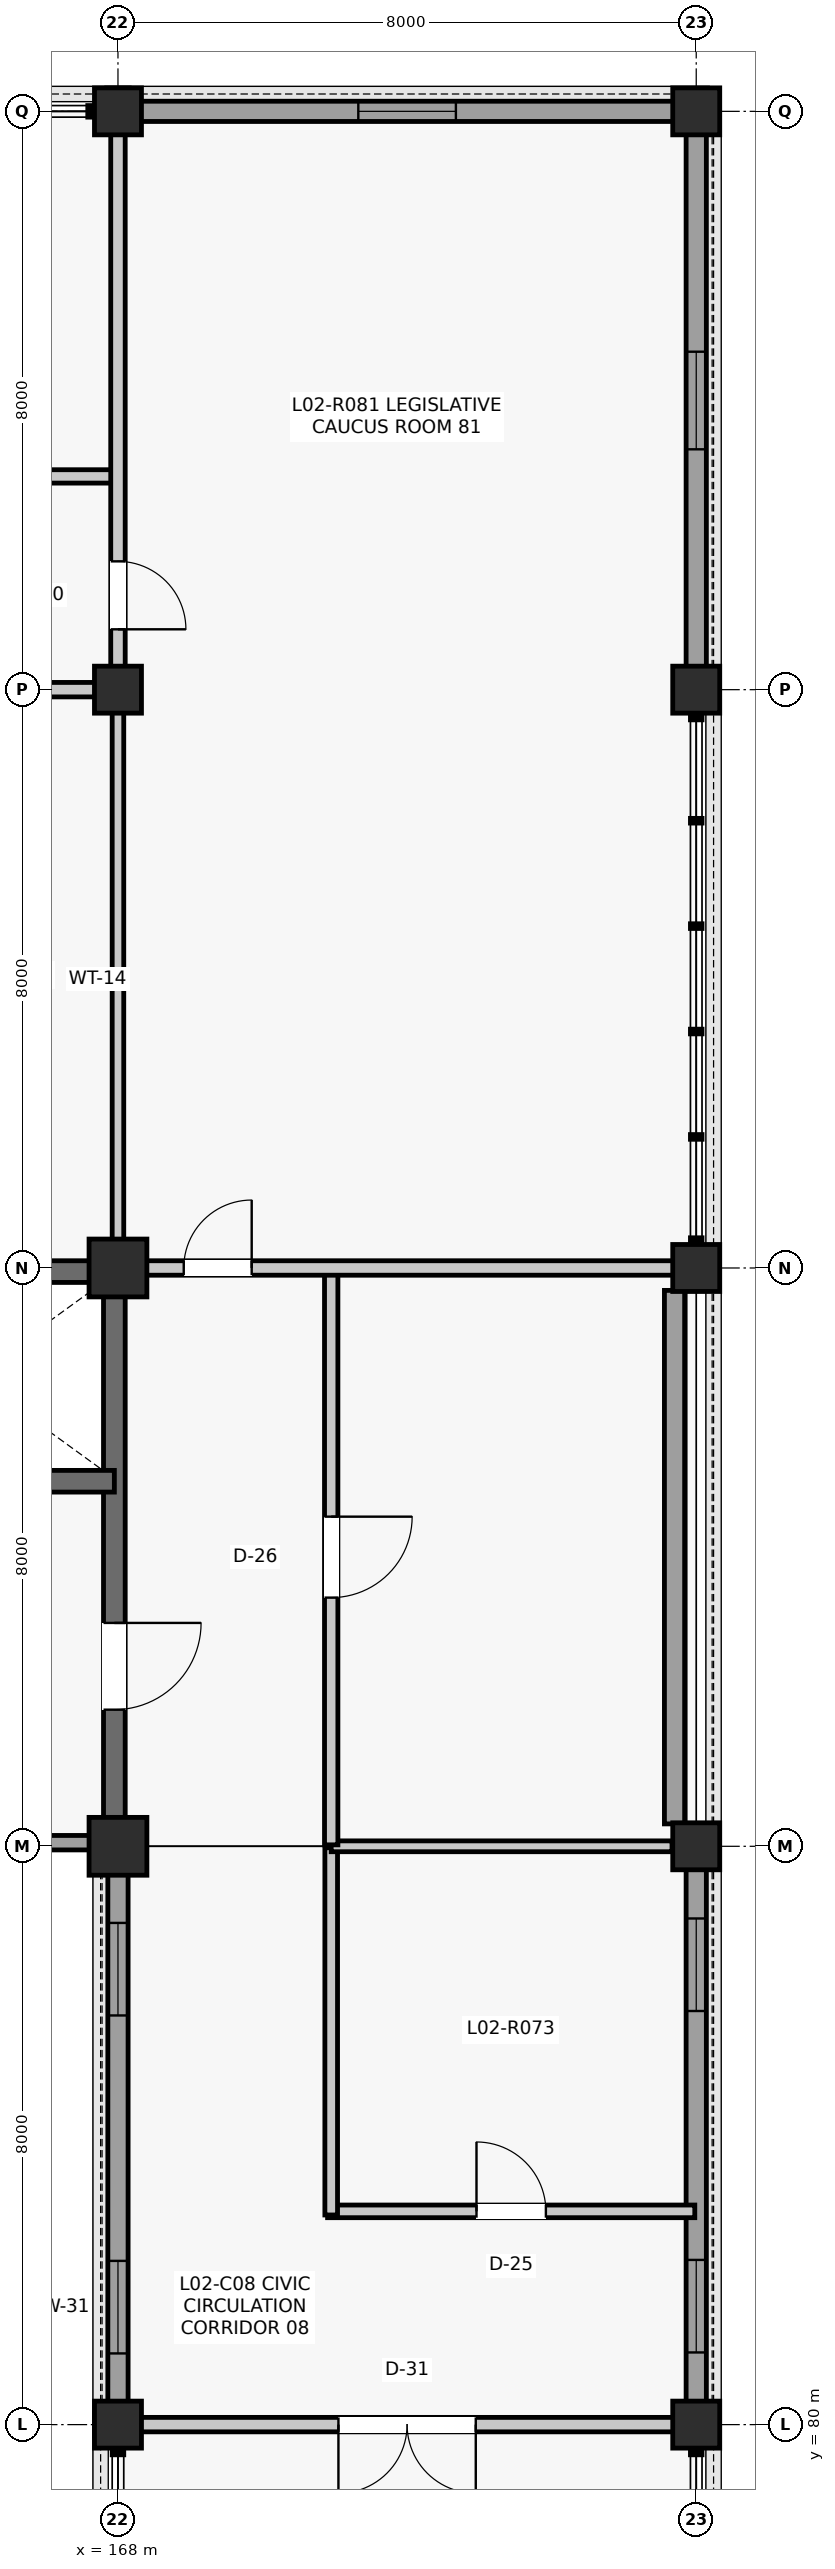
"""IFC4 building model, lengths in metres.
Left out: names, types, materials, properties, quantities, classifications, styles, units other than length and angle.
Written with IfcOpenShell. Run it as: python <this file> out.ifc"""

import sys

from ifc_helpers import new_model, si_unit, direction, frame, frame_2d, origin, origin_2d, place, context, subcontext, project, spatial, rectangle, extrude, element, fill, save


model = new_model("IFC4")
c1 = context("Model", 3, precision=1e-05, world=origin(), true_north=direction((0.0, 1.0)))
c2 = subcontext(c1, "Body", "Model", "MODEL_VIEW")
j1 = project(units=[si_unit("LENGTHUNIT", "METRE"), si_unit("PLANEANGLEUNIT", "RADIAN")], contexts=[c1])
p1 = place(None, origin())
s1 = spatial("IfcSite", under=j1, at=p1, CompositionType="ELEMENT")
p2 = place(p1, origin())
s2 = spatial("IfcBuilding", under=s1, at=p2, CompositionType="ELEMENT")
p3 = place(p2, frame((0.0, 0.0, 9.9)))
s3 = spatial("IfcBuildingStorey", under=s2, at=p3, CompositionType="ELEMENT", Elevation=9.9)
p4 = place(p3, frame((168.0, 80.0, 0.0), z_axis=(0.0, 0.0, 1.0), x_axis=(1.0, 0.0, 0.0)))
e1 = element("IfcColumn", 1, at=p4, inside=s3, PredefinedType="COLUMN", context=c2, shape_type="SweptSolid", body=[
    extrude(rectangle(XDim=0.65, YDim=0.65, at=origin_2d()), origin(), (0.0, 0.0, 1.0), 3.96),
])
for number, where, z_axis, x_axis in (
    (2, (168.0, 88.0, 0.0), (0.0, 0.0, 1.0), (1.0, 0.0, 0.0)),
    (3, (168.0, 96.0, 0.0), (0.0, 0.0, 1.0), (1.0, 0.0, 0.0)),
):
    element("IfcColumn", number, at=place(p3, frame(where, z_axis=z_axis, x_axis=x_axis)), inside=s3, PredefinedType="COLUMN", context=c2, shape_type="SweptSolid", body=[
        extrude(rectangle(XDim=0.8, YDim=0.8, at=origin_2d()), origin(), (0.0, 0.0, 1.0), 3.96),
    ])
for number, where, z_axis, x_axis in (
    (4, (168.0, 104.0, 0.0), (0.0, 0.0, 1.0), (1.0, 0.0, 0.0)),
    (5, (168.0, 112.0, 0.0), (0.0, 0.0, 1.0), (1.0, 0.0, 0.0)),
    (6, (176.0, 80.0, 0.0), (0.0, 0.0, 1.0), (1.0, 0.0, 0.0)),
    (7, (176.0, 88.0, 0.0), (0.0, 0.0, 1.0), (1.0, 0.0, 0.0)),
    (8, (176.0, 96.0, 0.0), (0.0, 0.0, 1.0), (1.0, 0.0, 0.0)),
    (9, (176.0, 104.0, 0.0), (0.0, 0.0, 1.0), (1.0, 0.0, 0.0)),
    (10, (176.0, 112.0, 0.0), (0.0, 0.0, 1.0), (1.0, 0.0, 0.0)),
):
    element("IfcColumn", number, at=place(p3, frame(where, z_axis=z_axis, x_axis=x_axis)), inside=s3, PredefinedType="COLUMN", context=c2, shape_type="SweptSolid", body=[
        extrude(rectangle(XDim=0.65, YDim=0.65, at=origin_2d()), origin(), (0.0, 0.0, 1.0), 3.96),
    ])
p5 = place(p3, frame((168.0, 80.31, 0.0), z_axis=(0.0, 0.0, 1.0), x_axis=(0.0, 1.0, 0.0)))
e11 = element("IfcWall", 11, at=p5, inside=s3, PredefinedType="SOLIDWALL", context=c2, shape_type="SweptSolid", body=[
    extrude(rectangle(XDim=7.305, YDim=0.28, at=frame_2d((3.652, 0.0))), origin(), (0.0, 0.0, 1.0), 3.344),
])
p6 = place(p5, frame((0.675, 0.0, 0.95)))
e12 = element("IfcOpeningElement", 12, at=p6, cuts=e11, PredefinedType="OPENING", context=c2, shape_type="SweptSolid", body=[
    extrude(rectangle(XDim=1.28, YDim=1.72, at=frame_2d((0.64, 0.86))), frame((0.0, 0.15, 0.0), z_axis=(0.0, -1.0, 0.0), x_axis=(1.0, 0.0, 0.0)), (0.0, 0.0, 1.0), 0.3),
])
p7 = place(p5, frame((5.35, 0.0, 0.95)))
e13 = element("IfcOpeningElement", 13, at=p7, cuts=e11, PredefinedType="OPENING", context=c2, shape_type="SweptSolid", body=[
    extrude(rectangle(XDim=1.28, YDim=1.72, at=frame_2d((0.64, 0.86))), frame((0.0, 0.15, 0.0), z_axis=(0.0, -1.0, 0.0), x_axis=(1.0, 0.0, 0.0)), (0.0, 0.0, 1.0), 0.3),
])
p8 = place(p3, frame((176.0, 80.31, 0.0), z_axis=(0.0, 0.0, 1.0), x_axis=(0.0, 1.0, 0.0)))
e14 = element("IfcWall", 14, at=p8, inside=s3, PredefinedType="SOLIDWALL", context=c2, shape_type="SweptSolid", body=[
    extrude(rectangle(XDim=7.38, YDim=0.28, at=frame_2d((3.69, 0.0))), origin(), (0.0, 0.0, 1.0), 3.284),
])
p9 = place(p8, frame((0.688, 0.0, 0.95)))
e15 = element("IfcOpeningElement", 15, at=p9, cuts=e14, PredefinedType="OPENING", context=c2, shape_type="SweptSolid", body=[
    extrude(rectangle(XDim=1.28, YDim=1.72, at=frame_2d((0.64, 0.86))), frame((0.0, 0.15, 0.0), z_axis=(0.0, -1.0, 0.0), x_axis=(1.0, 0.0, 0.0)), (0.0, 0.0, 1.0), 0.3),
])
p10 = place(p8, frame((5.412, 0.0, 0.95)))
e16 = element("IfcOpeningElement", 16, at=p10, cuts=e14, PredefinedType="OPENING", context=c2, shape_type="SweptSolid", body=[
    extrude(rectangle(XDim=1.28, YDim=1.72, at=frame_2d((0.64, 0.86))), frame((0.0, 0.15, 0.0), z_axis=(0.0, -1.0, 0.0), x_axis=(1.0, 0.0, 0.0)), (0.0, 0.0, 1.0), 0.3),
])
p11 = place(p3, frame((175.7, 88.31, 0.0), z_axis=(0.0, 0.0, 1.0), x_axis=(0.0, 1.0, 0.0)))
e17 = element("IfcWall", 17, at=p11, inside=s3, PredefinedType="SOLIDWALL", context=c2, shape_type="SweptSolid", body=[
    extrude(rectangle(XDim=7.38, YDim=0.28, at=frame_2d((3.69, 0.0))), origin(), (0.0, 0.0, 1.0), 3.347),
])
p12 = place(p3, frame((168.31, 112.0, 0.0), z_axis=(0.0, 0.0, 1.0), x_axis=(1.0, 0.0, 0.0)))
e18 = element("IfcWall", 18, at=p12, inside=s3, PredefinedType="SOLIDWALL", context=c2, shape_type="SweptSolid", body=[
    extrude(rectangle(XDim=7.38, YDim=0.28, at=frame_2d((3.69, 0.0))), origin(), (0.0, 0.0, 1.0), 3.344),
])
p13 = place(p12, frame((3.015, 0.0, 0.9)))
e19 = element("IfcOpeningElement", 19, at=p13, cuts=e18, PredefinedType="OPENING", context=c2, shape_type="SweptSolid", body=[
    extrude(rectangle(XDim=1.35, YDim=1.9, at=frame_2d((0.675, 0.95))), frame((0.0, 0.15, 0.0), z_axis=(0.0, -1.0, 0.0), x_axis=(1.0, 0.0, 0.0)), (0.0, 0.0, 1.0), 0.3),
])
p14 = place(p3, frame((176.0, 104.31, 0.0), z_axis=(0.0, 0.0, 1.0), x_axis=(0.0, 1.0, 0.0)))
e20 = element("IfcWall", 20, at=p14, inside=s3, PredefinedType="SOLIDWALL", context=c2, shape_type="SweptSolid", body=[
    extrude(rectangle(XDim=7.38, YDim=0.28, at=frame_2d((3.69, 0.0))), origin(), (0.0, 0.0, 1.0), 3.344),
])
p15 = place(p14, frame((3.015, 0.0, 0.9)))
e21 = element("IfcOpeningElement", 21, at=p15, cuts=e20, PredefinedType="OPENING", context=c2, shape_type="SweptSolid", body=[
    extrude(rectangle(XDim=1.35, YDim=1.9, at=frame_2d((0.675, 0.95))), frame((0.0, 0.15, 0.0), z_axis=(0.0, -1.0, 0.0), x_axis=(1.0, 0.0, 0.0)), (0.0, 0.0, 1.0), 0.3),
])
p16 = place(p3, frame((160.29, 95.95, 0.0), z_axis=(0.0, 0.0, 1.0), x_axis=(1.0, 0.0, 0.0)))
e22 = element("IfcWall", 22, at=p16, inside=s3, PredefinedType="SHEAR", context=c2, shape_type="SweptSolid", body=[
    extrude(rectangle(XDim=7.42, YDim=0.3, at=frame_2d((3.71, 0.0))), origin(), (0.0, 0.0, 1.0), 3.705),
])
p17 = place(p3, frame((167.95, 88.29, 0.0), z_axis=(0.0, 0.0, 1.0), x_axis=(0.0, 1.0, 0.0)))
e23 = element("IfcWall", 23, at=p17, inside=s3, PredefinedType="SHEAR", context=c2, shape_type="SweptSolid", body=[
    extrude(rectangle(XDim=7.42, YDim=0.3, at=frame_2d((3.71, 0.0))), origin(), (0.0, 0.0, 1.0), 3.705),
])
p18 = place(p17, frame((1.6, 0.0, 0.0)))
e24 = element("IfcOpeningElement", 24, at=p18, cuts=e23, PredefinedType="OPENING", context=c2, shape_type="SweptSolid", body=[
    extrude(rectangle(XDim=1.2, YDim=2.15, at=frame_2d((0.6, 1.075))), frame((0.0, 0.16, 0.0), z_axis=(0.0, -1.0, 0.0), x_axis=(1.0, 0.0, 0.0)), (0.0, 0.0, 1.0), 0.32),
])
p19 = place(p3, frame((164.0, 93.05, 0.0), z_axis=(0.0, 0.0, 1.0), x_axis=(1.0, 0.0, 0.0)))
e25 = element("IfcWall", 25, at=p19, inside=s3, PredefinedType="SHEAR", context=c2, shape_type="SweptSolid", body=[
    extrude(rectangle(XDim=3.95, YDim=0.3, at=frame_2d((1.975, 0.0))), origin(), (0.0, 0.0, 1.0), 3.705),
])
p20 = place(p19, frame((1.375, 0.0, 0.0)))
e26 = element("IfcOpeningElement", 26, at=p20, cuts=e25, PredefinedType="OPENING", context=c2, shape_type="SweptSolid", body=[
    extrude(rectangle(XDim=1.2, YDim=2.2, at=frame_2d((0.6, 1.1))), frame((0.0, 0.16, 0.0), z_axis=(0.0, -1.0, 0.0), x_axis=(1.0, 0.0, 0.0)), (0.0, 0.0, 1.0), 0.32),
])
p21 = place(p3, frame((164.0, 88.05, 0.0), z_axis=(0.0, 0.0, 1.0), x_axis=(1.0, 0.0, 0.0)))
e27 = element("IfcWall", 27, at=p21, inside=s3, PredefinedType="PARTITIONING", context=c2, shape_type="SweptSolid", body=[
    extrude(rectangle(XDim=3.61, YDim=0.2, at=frame_2d((1.805, 0.0))), origin(), (0.0, 0.0, 1.0), 3.337),
])
p22 = place(p3, frame((160.02, 106.95, 0.0), z_axis=(0.0, 0.0, 1.0), x_axis=(1.0, 0.0, 0.0)))
e28 = element("IfcWall", 28, at=p22, inside=s3, PredefinedType="PARTITIONING", context=c2, shape_type="SweptSolid", body=[
    extrude(rectangle(XDim=7.96, YDim=0.185, at=frame_2d((3.98, 0.0))), origin(), (0.0, 0.0, 1.0), 3.151),
])
p23 = place(p22, frame((3.47, 0.0, 0.0)))
e29 = element("IfcOpeningElement", 29, at=p23, cuts=e28, PredefinedType="OPENING", context=c2, shape_type="SweptSolid", body=[
    extrude(rectangle(XDim=1.02, YDim=2.2, at=frame_2d((0.51, 1.1))), frame((0.0, 0.103, 0.0), z_axis=(0.0, -1.0, 0.0), x_axis=(1.0, 0.0, 0.0)), (0.0, 0.0, 1.0), 0.205),
])
p24 = place(p3, frame((170.9, 82.95, 0.0), z_axis=(0.0, 0.0, 1.0), x_axis=(1.0, 0.0, 0.0)))
e30 = element("IfcWall", 30, at=p24, inside=s3, PredefinedType="PARTITIONING", context=c2, shape_type="SweptSolid", body=[
    extrude(rectangle(XDim=5.08, YDim=0.175, at=frame_2d((2.54, 0.0))), origin(), (0.0, 0.0, 1.0), 3.277),
])
p25 = place(p24, frame((2.06, 0.0, 0.0)))
e31 = element("IfcOpeningElement", 31, at=p25, cuts=e30, PredefinedType="OPENING", context=c2, shape_type="SweptSolid", body=[
    extrude(rectangle(XDim=0.96, YDim=2.14, at=frame_2d((0.48, 1.07))), frame((0.0, 0.097, 0.0), z_axis=(0.0, -1.0, 0.0), x_axis=(1.0, 0.0, 0.0)), (0.0, 0.0, 1.0), 0.195),
])
p26 = place(p3, frame((170.95, 82.9, 0.0), z_axis=(0.0, 0.0, 1.0), x_axis=(0.0, 1.0, 0.0)))
e32 = element("IfcWall", 32, at=p26, inside=s3, PredefinedType="PARTITIONING", context=c2, shape_type="SweptSolid", body=[
    extrude(rectangle(XDim=5.08, YDim=0.175, at=frame_2d((2.54, 0.0))), origin(), (0.0, 0.0, 1.0), 3.082),
])
p27 = place(p3, frame((170.95, 88.0, 0.0), z_axis=(0.0, 0.0, 1.0), x_axis=(1.0, 0.0, 0.0)))
e33 = element("IfcWall", 33, at=p27, inside=s3, PredefinedType="PARTITIONING", context=c2, shape_type="SweptSolid", body=[
    extrude(rectangle(XDim=4.715, YDim=0.15, at=frame_2d((2.357, 0.0))), origin(), (0.0, 0.0, 1.0), 3.082),
])
p28 = place(p3, frame((170.95, 88.02, 0.0), z_axis=(0.0, 0.0, 1.0), x_axis=(0.0, 1.0, 0.0)))
e34 = element("IfcWall", 34, at=p28, inside=s3, PredefinedType="PARTITIONING", context=c2, shape_type="SweptSolid", body=[
    extrude(rectangle(XDim=7.96, YDim=0.185, at=frame_2d((3.98, 0.0))), origin(), (0.0, 0.0, 1.0), 3.082),
])
p29 = place(p28, frame((3.42, 0.0, 0.0)))
e35 = element("IfcOpeningElement", 35, at=p29, cuts=e34, PredefinedType="OPENING", context=c2, shape_type="SweptSolid", body=[
    extrude(rectangle(XDim=1.12, YDim=2.22, at=frame_2d((0.56, 1.11))), frame((0.0, 0.103, 0.0), z_axis=(0.0, -1.0, 0.0), x_axis=(1.0, 0.0, 0.0)), (0.0, 0.0, 1.0), 0.205),
])
p30 = place(p3, frame((168.0, 96.39, 0.0), z_axis=(0.0, 0.0, 1.0), x_axis=(0.0, 1.0, 0.0)))
e36 = element("IfcWall", 36, at=p30, inside=s3, PredefinedType="PARTITIONING", context=c2, shape_type="SweptSolid", body=[
    extrude(rectangle(XDim=7.295, YDim=0.16, at=frame_2d((3.647, 0.0))), origin(), (0.0, 0.0, 1.0), 3.227),
])
p31 = place(p3, frame((160.315, 104.0, 0.0), z_axis=(0.0, 0.0, 1.0), x_axis=(1.0, 0.0, 0.0)))
e37 = element("IfcWall", 37, at=p31, inside=s3, PredefinedType="PARTITIONING", context=c2, shape_type="SweptSolid", body=[
    extrude(rectangle(XDim=7.37, YDim=0.2, at=frame_2d((3.685, 0.0))), origin(), (0.0, 0.0, 1.0), 3.157),
])
p32 = place(p31, frame((1.367, 0.0, 0.0)))
e38 = element("IfcOpeningElement", 38, at=p32, cuts=e37, PredefinedType="OPENING", context=c2, shape_type="SweptSolid", body=[
    extrude(rectangle(XDim=0.95, YDim=2.1, at=frame_2d((0.475, 1.05))), frame((0.0, 0.11, 0.0), z_axis=(0.0, -1.0, 0.0), x_axis=(1.0, 0.0, 0.0)), (0.0, 0.0, 1.0), 0.22),
])
p33 = place(p31, frame((5.421, 0.0, 0.0)))
e39 = element("IfcOpeningElement", 39, at=p33, cuts=e37, PredefinedType="OPENING", context=c2, shape_type="SweptSolid", body=[
    extrude(rectangle(XDim=0.95, YDim=2.1, at=frame_2d((0.475, 1.05))), frame((0.0, 0.11, 0.0), z_axis=(0.0, -1.0, 0.0), x_axis=(1.0, 0.0, 0.0)), (0.0, 0.0, 1.0), 0.22),
])
p34 = place(p3, frame((168.0, 104.315, 0.0), z_axis=(0.0, 0.0, 1.0), x_axis=(0.0, 1.0, 0.0)))
e40 = element("IfcWall", 40, at=p34, inside=s3, PredefinedType="PARTITIONING", context=c2, shape_type="SweptSolid", body=[
    extrude(rectangle(XDim=7.37, YDim=0.2, at=frame_2d((3.685, 0.0))), origin(), (0.0, 0.0, 1.0), 3.151),
])
p35 = place(p34, frame((0.52, 0.0, 0.0)))
e41 = element("IfcOpeningElement", 41, at=p35, cuts=e40, PredefinedType="OPENING", context=c2, shape_type="SweptSolid", body=[
    extrude(rectangle(XDim=0.94, YDim=2.12, at=frame_2d((0.47, 1.06))), frame((0.0, 0.11, 0.0), z_axis=(0.0, -1.0, 0.0), x_axis=(1.0, 0.0, 0.0)), (0.0, 0.0, 1.0), 0.22),
])
p36 = place(p3, frame((168.315, 80.0, 0.0), z_axis=(0.0, 0.0, 1.0), x_axis=(1.0, 0.0, 0.0)))
e42 = element("IfcWall", 42, at=p36, inside=s3, PredefinedType="PARTITIONING", context=c2, shape_type="SweptSolid", body=[
    extrude(rectangle(XDim=7.37, YDim=0.2, at=frame_2d((3.685, 0.0))), origin(), (0.0, 0.0, 1.0), 3.151),
])
p37 = place(p36, frame((2.735, 0.0, 0.0)))
e43 = element("IfcOpeningElement", 43, at=p37, cuts=e42, PredefinedType="OPENING", context=c2, shape_type="SweptSolid", body=[
    extrude(rectangle(XDim=1.9, YDim=2.38, at=frame_2d((0.95, 1.19))), frame((0.0, 0.11, 0.0), z_axis=(0.0, -1.0, 0.0), x_axis=(1.0, 0.0, 0.0)), (0.0, 0.0, 1.0), 0.22),
])
p38 = place(p3, frame((168.39, 96.0, 0.0), z_axis=(0.0, 0.0, 1.0), x_axis=(1.0, 0.0, 0.0)))
e44 = element("IfcWall", 44, at=p38, inside=s3, PredefinedType="PARTITIONING", context=c2, shape_type="SweptSolid", body=[
    extrude(rectangle(XDim=7.295, YDim=0.2, at=frame_2d((3.647, 0.0))), origin(), (0.0, 0.0, 1.0), 3.157),
])
p39 = place(p38, frame((0.52, 0.0, 0.0)))
e45 = element("IfcOpeningElement", 45, at=p39, cuts=e44, PredefinedType="OPENING", context=c2, shape_type="SweptSolid", body=[
    extrude(rectangle(XDim=0.94, YDim=2.12, at=frame_2d((0.47, 1.06))), frame((0.0, 0.11, 0.0), z_axis=(0.0, -1.0, 0.0), x_axis=(1.0, 0.0, 0.0)), (0.0, 0.0, 1.0), 0.22),
])
p40 = place(p6, origin())
e46 = element("IfcWindow", 46, at=p40, inside=s3, PartitioningType="SINGLE_PANEL", PredefinedType="WINDOW", context=c2, shape_type="SweptSolid", body=[
    extrude(rectangle(XDim=1.28, YDim=1.72, at=frame_2d((0.64, 0.86))), frame((0.0, 0.03, 0.0), z_axis=(0.0, -1.0, 0.0), x_axis=(1.0, 0.0, 0.0)), (0.0, 0.0, 1.0), 0.06),
])
fill(e12, e46)
p41 = place(p7, origin())
e47 = element("IfcWindow", 47, at=p41, inside=s3, PartitioningType="SINGLE_PANEL", PredefinedType="WINDOW", context=c2, shape_type="SweptSolid", body=[
    extrude(rectangle(XDim=1.28, YDim=1.72, at=frame_2d((0.64, 0.86))), frame((0.0, 0.03, 0.0), z_axis=(0.0, -1.0, 0.0), x_axis=(1.0, 0.0, 0.0)), (0.0, 0.0, 1.0), 0.06),
])
fill(e13, e47)
p42 = place(p9, origin())
e48 = element("IfcWindow", 48, at=p42, inside=s3, PartitioningType="SINGLE_PANEL", PredefinedType="WINDOW", context=c2, shape_type="SweptSolid", body=[
    extrude(rectangle(XDim=1.28, YDim=1.72, at=frame_2d((0.64, 0.86))), frame((0.0, 0.03, 0.0), z_axis=(0.0, -1.0, 0.0), x_axis=(1.0, 0.0, 0.0)), (0.0, 0.0, 1.0), 0.06),
])
fill(e15, e48)
p43 = place(p10, origin())
e49 = element("IfcWindow", 49, at=p43, inside=s3, PartitioningType="SINGLE_PANEL", PredefinedType="WINDOW", context=c2, shape_type="SweptSolid", body=[
    extrude(rectangle(XDim=1.28, YDim=1.72, at=frame_2d((0.64, 0.86))), frame((0.0, 0.03, 0.0), z_axis=(0.0, -1.0, 0.0), x_axis=(1.0, 0.0, 0.0)), (0.0, 0.0, 1.0), 0.06),
])
fill(e16, e49)
p44 = place(p13, origin())
e50 = element("IfcWindow", 50, at=p44, inside=s3, PartitioningType="SINGLE_PANEL", PredefinedType="WINDOW", context=c2, shape_type="SweptSolid", body=[
    extrude(rectangle(XDim=1.35, YDim=1.9, at=frame_2d((0.675, 0.95))), frame((0.0, 0.03, 0.0), z_axis=(0.0, -1.0, 0.0), x_axis=(1.0, 0.0, 0.0)), (0.0, 0.0, 1.0), 0.06),
])
fill(e19, e50)
p45 = place(p15, origin())
e51 = element("IfcWindow", 51, at=p45, inside=s3, PartitioningType="SINGLE_PANEL", PredefinedType="WINDOW", context=c2, shape_type="SweptSolid", body=[
    extrude(rectangle(XDim=1.35, YDim=1.9, at=frame_2d((0.675, 0.95))), frame((0.0, 0.03, 0.0), z_axis=(0.0, -1.0, 0.0), x_axis=(1.0, 0.0, 0.0)), (0.0, 0.0, 1.0), 0.06),
])
fill(e21, e51)
p46 = place(p18, frame((1.2, 0.0, 0.0), z_axis=(0.0, 0.0, 1.0), x_axis=(-1.0, 0.0, 0.0)))
e52 = element("IfcDoor", 52, at=p46, inside=s3, OperationType="SINGLE_SWING_RIGHT", PredefinedType="DOOR", context=c2, shape_type="SweptSolid", body=[
    extrude(rectangle(XDim=1.2, YDim=2.15, at=frame_2d((0.6, 1.075))), frame((0.0, 0.025, 0.0), z_axis=(0.0, -1.0, 0.0), x_axis=(1.0, 0.0, 0.0)), (0.0, 0.0, 1.0), 0.05),
])
fill(e24, e52)
p47 = place(p25, origin())
e53 = element("IfcDoor", 53, at=p47, inside=s3, OperationType="SINGLE_SWING_LEFT", PredefinedType="DOOR", context=c2, shape_type="SweptSolid", body=[
    extrude(rectangle(XDim=0.96, YDim=2.14, at=frame_2d((0.48, 1.07))), frame((0.0, 0.025, 0.0), z_axis=(0.0, -1.0, 0.0), x_axis=(1.0, 0.0, 0.0)), (0.0, 0.0, 1.0), 0.05),
])
fill(e31, e53)
p48 = place(p29, frame((1.12, 0.0, 0.0), z_axis=(0.0, 0.0, 1.0), x_axis=(-1.0, 0.0, 0.0)))
e54 = element("IfcDoor", 54, at=p48, inside=s3, OperationType="SINGLE_SWING_RIGHT", PredefinedType="DOOR", context=c2, shape_type="SweptSolid", body=[
    extrude(rectangle(XDim=1.12, YDim=2.22, at=frame_2d((0.56, 1.11))), frame((0.0, 0.025, 0.0), z_axis=(0.0, -1.0, 0.0), x_axis=(1.0, 0.0, 0.0)), (0.0, 0.0, 1.0), 0.05),
])
fill(e35, e54)
p49 = place(p35, frame((0.94, 0.0, 0.0), z_axis=(0.0, 0.0, 1.0), x_axis=(-1.0, 0.0, 0.0)))
e55 = element("IfcDoor", 55, at=p49, inside=s3, OperationType="SINGLE_SWING_LEFT", PredefinedType="DOOR", context=c2, shape_type="SweptSolid", body=[
    extrude(rectangle(XDim=0.94, YDim=2.12, at=frame_2d((0.47, 1.06))), frame((0.0, 0.025, 0.0), z_axis=(0.0, -1.0, 0.0), x_axis=(1.0, 0.0, 0.0)), (0.0, 0.0, 1.0), 0.05),
])
fill(e41, e55)
p50 = place(p37, frame((1.9, 0.0, 0.0), z_axis=(0.0, 0.0, 1.0), x_axis=(-1.0, 0.0, 0.0)))
e56 = element("IfcDoor", 56, at=p50, inside=s3, OperationType="DOUBLE_DOOR_SINGLE_SWING", PredefinedType="DOOR", context=c2, shape_type="SweptSolid", body=[
    extrude(rectangle(XDim=1.9, YDim=2.38, at=frame_2d((0.95, 1.19))), frame((0.0, 0.025, 0.0), z_axis=(0.0, -1.0, 0.0), x_axis=(1.0, 0.0, 0.0)), (0.0, 0.0, 1.0), 0.05),
])
fill(e43, e56)
p51 = place(p39, origin())
e57 = element("IfcDoor", 57, at=p51, inside=s3, OperationType="SINGLE_SWING_RIGHT", PredefinedType="DOOR", context=c2, shape_type="SweptSolid", body=[
    extrude(rectangle(XDim=0.94, YDim=2.12, at=frame_2d((0.47, 1.06))), frame((0.0, 0.025, 0.0), z_axis=(0.0, -1.0, 0.0), x_axis=(1.0, 0.0, 0.0)), (0.0, 0.0, 1.0), 0.05),
])
fill(e45, e57)
save(model, sys.argv[1])
